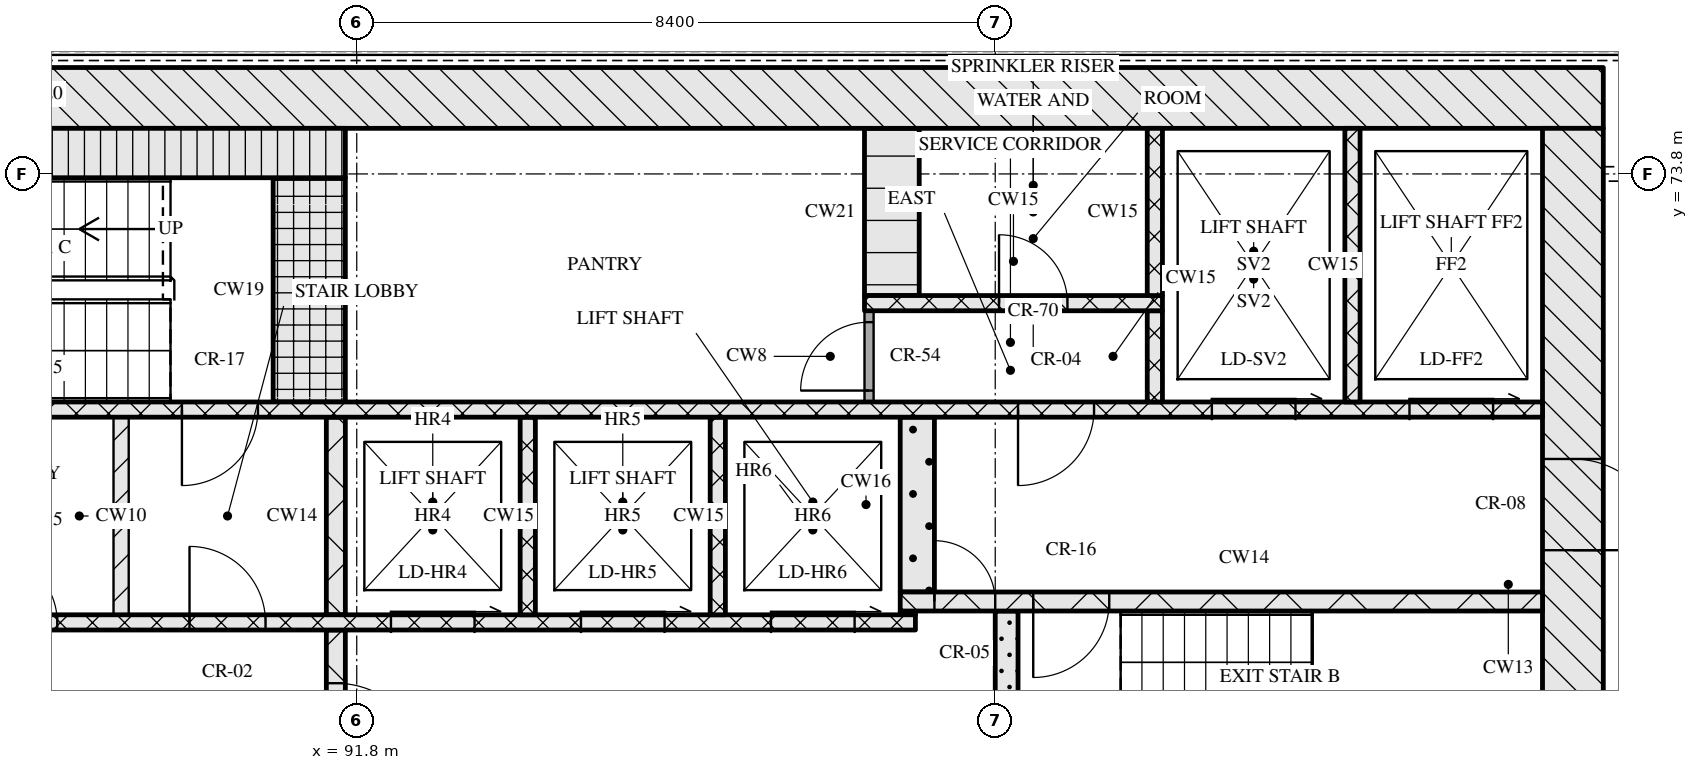
"""IFC4 building model, lengths in metres.
Left out: names, types, materials, properties, quantities, classifications, styles, units other than length and angle.
Written with IfcOpenShell. Run it as: python <this file> out.ifc"""

import sys

from ifc_helpers import new_model, si_unit, direction, frame, frame_2d, origin, place, context, subcontext, project, spatial, rectangle, extrude, element, fill, save


model = new_model("IFC4")
c1 = context("Model", 3, precision=1e-05, world=origin(), true_north=direction((0.0, 1.0)))
c2 = subcontext(c1, "Body", "Model", "MODEL_VIEW")
j1 = project(units=[si_unit("LENGTHUNIT", "METRE"), si_unit("PLANEANGLEUNIT", "RADIAN")], contexts=[c1])
p1 = place(None, origin())
s1 = spatial("IfcSite", under=j1, at=p1, CompositionType="ELEMENT")
p2 = place(p1, origin())
s2 = spatial("IfcBuilding", under=s1, at=p2, CompositionType="ELEMENT")
p3 = place(p2, frame((0.0, 0.0, 179.85)))
s3 = spatial("IfcBuildingStorey", under=s2, at=p3, CompositionType="ELEMENT", Elevation=179.85)
p4 = place(p3, frame((67.0, 74.8, 0.0), z_axis=(0.0, 0.0, 1.0), x_axis=(1.0, 0.0, 0.0)))
e1 = element("IfcWall", 1, at=p4, inside=s3, PredefinedType="SOLIDWALL", context=c2, shape_type="SweptSolid", body=[
    extrude(rectangle(XDim=41.2, YDim=0.8, at=frame_2d((20.6, 0.0))), origin(), (0.0, 0.0, 1.0), 3.32),
])
p5 = place(p3, frame((107.8, 62.4, 0.0), z_axis=(0.0, 0.0, 1.0), x_axis=(0.0, 1.0, 0.0)))
e2 = element("IfcWall", 2, at=p5, inside=s3, PredefinedType="SOLIDWALL", context=c2, shape_type="SweptSolid", body=[
    extrude(rectangle(XDim=12.0, YDim=0.8, at=frame_2d((6.0, 0.0))), origin(), (0.0, 0.0, 1.0), 3.32),
])
p6 = place(p5, frame((6.45, 0.0, 0.0)))
e3 = element("IfcOpeningElement", 3, at=p6, cuts=e2, PredefinedType="OPENING", context=c2, shape_type="SweptSolid", body=[
    extrude(rectangle(XDim=1.2, YDim=2.1, at=frame_2d((0.6, 1.05))), frame((0.0, 0.41, 0.0), z_axis=(0.0, -1.0, 0.0), x_axis=(1.0, 0.0, 0.0)), (0.0, 0.0, 1.0), 0.82),
])
p7 = place(p3, frame((91.525, 65.2, 0.0), z_axis=(0.0, 0.0, 1.0), x_axis=(0.0, 1.0, 0.0)))
e4 = element("IfcWall", 4, at=p7, inside=s3, PredefinedType="SOLIDWALL", context=c2, shape_type="SweptSolid", body=[
    extrude(rectangle(XDim=2.6, YDim=0.25, at=frame_2d((1.3, 0.0))), origin(), (0.0, 0.0, 1.0), 3.32),
])
p8 = place(p7, frame((0.7, 0.0, 0.0)))
e5 = element("IfcOpeningElement", 5, at=p8, cuts=e4, PredefinedType="OPENING", context=c2, shape_type="SweptSolid", body=[
    extrude(rectangle(XDim=1.2, YDim=2.1, at=frame_2d((0.6, 1.05))), frame((0.0, 0.135, 0.0), z_axis=(0.0, -1.0, 0.0), x_axis=(1.0, 0.0, 0.0)), (0.0, 0.0, 1.0), 0.27),
])
p9 = place(p3, frame((100.35, 65.2, 0.0), z_axis=(0.0, 0.0, 1.0), x_axis=(0.0, 1.0, 0.0)))
e6 = element("IfcWall", 6, at=p9, inside=s3, PredefinedType="SOLIDWALL", context=c2, shape_type="SweptSolid", body=[
    extrude(rectangle(XDim=2.85, YDim=0.3, at=frame_2d((1.425, 0.0))), origin(), (0.0, 0.0, 1.0), 3.32),
])
p10 = place(p3, frame((76.05, 67.9, 0.0), z_axis=(0.0, 0.0, 1.0), x_axis=(1.0, 0.0, 0.0)))
e7 = element("IfcWall", 7, at=p10, inside=s3, PredefinedType="SOLIDWALL", context=c2, shape_type="SweptSolid", body=[
    extrude(rectangle(XDim=23.1, YDim=0.2, at=frame_2d((11.55, 0.0))), origin(), (0.0, 0.0, 1.0), 3.32),
])
p11 = place(p10, frame((0.75, 0.0, 0.0)))
e8 = element("IfcOpeningElement", 8, at=p11, cuts=e7, PredefinedType="OPENING", context=c2, shape_type="SweptSolid", body=[
    extrude(rectangle(XDim=0.9, YDim=2.1, at=frame_2d((0.45, 1.05))), frame((0.0, 0.11, 0.0), z_axis=(0.0, -1.0, 0.0), x_axis=(1.0, 0.0, 0.0)), (0.0, 0.0, 1.0), 0.22),
])
p12 = place(p10, frame((3.32, 0.0, 0.0)))
e9 = element("IfcOpeningElement", 9, at=p12, cuts=e7, PredefinedType="OPENING", context=c2, shape_type="SweptSolid", body=[
    extrude(rectangle(XDim=0.9, YDim=2.1, at=frame_2d((0.45, 1.05))), frame((0.0, 0.11, 0.0), z_axis=(0.0, -1.0, 0.0), x_axis=(1.0, 0.0, 0.0)), (0.0, 0.0, 1.0), 0.22),
])
p13 = place(p10, frame((5.77, 0.0, 0.0)))
e10 = element("IfcOpeningElement", 10, at=p13, cuts=e7, PredefinedType="OPENING", context=c2, shape_type="SweptSolid", body=[
    extrude(rectangle(XDim=0.9, YDim=2.1, at=frame_2d((0.45, 1.05))), frame((0.0, 0.11, 0.0), z_axis=(0.0, -1.0, 0.0), x_axis=(1.0, 0.0, 0.0)), (0.0, 0.0, 1.0), 0.22),
])
p14 = place(p10, frame((8.45, 0.0, 0.0)))
e11 = element("IfcOpeningElement", 11, at=p14, cuts=e7, PredefinedType="OPENING", context=c2, shape_type="SweptSolid", body=[
    extrude(rectangle(XDim=0.9, YDim=2.1, at=frame_2d((0.45, 1.05))), frame((0.0, 0.11, 0.0), z_axis=(0.0, -1.0, 0.0), x_axis=(1.0, 0.0, 0.0)), (0.0, 0.0, 1.0), 0.22),
])
p15 = place(p10, frame((10.91, 0.0, 0.0)))
e12 = element("IfcOpeningElement", 12, at=p15, cuts=e7, PredefinedType="OPENING", context=c2, shape_type="SweptSolid", body=[
    extrude(rectangle(XDim=0.9, YDim=2.1, at=frame_2d((0.45, 1.05))), frame((0.0, 0.11, 0.0), z_axis=(0.0, -1.0, 0.0), x_axis=(1.0, 0.0, 0.0)), (0.0, 0.0, 1.0), 0.22),
])
p16 = place(p10, frame((13.55, 0.0, 0.0)))
e13 = element("IfcOpeningElement", 13, at=p16, cuts=e7, PredefinedType="OPENING", context=c2, shape_type="SweptSolid", body=[
    extrude(rectangle(XDim=1.0, YDim=2.1, at=frame_2d((0.5, 1.05))), frame((0.0, 0.11, 0.0), z_axis=(0.0, -1.0, 0.0), x_axis=(1.0, 0.0, 0.0)), (0.0, 0.0, 1.0), 0.22),
])
p17 = place(p10, frame((16.2, 0.0, 0.0)))
e14 = element("IfcOpeningElement", 14, at=p17, cuts=e7, PredefinedType="OPENING", context=c2, shape_type="SweptSolid", body=[
    extrude(rectangle(XDim=1.1, YDim=2.1, at=frame_2d((0.55, 1.05))), frame((0.0, 0.11, 0.0), z_axis=(0.0, -1.0, 0.0), x_axis=(1.0, 0.0, 0.0)), (0.0, 0.0, 1.0), 0.22),
])
p18 = place(p10, frame((18.7, 0.0, 0.0)))
e15 = element("IfcOpeningElement", 15, at=p18, cuts=e7, PredefinedType="OPENING", context=c2, shape_type="SweptSolid", body=[
    extrude(rectangle(XDim=1.1, YDim=2.1, at=frame_2d((0.55, 1.05))), frame((0.0, 0.11, 0.0), z_axis=(0.0, -1.0, 0.0), x_axis=(1.0, 0.0, 0.0)), (0.0, 0.0, 1.0), 0.22),
])
p19 = place(p10, frame((21.2, 0.0, 0.0)))
e16 = element("IfcOpeningElement", 16, at=p19, cuts=e7, PredefinedType="OPENING", context=c2, shape_type="SweptSolid", body=[
    extrude(rectangle(XDim=1.1, YDim=2.1, at=frame_2d((0.55, 1.05))), frame((0.0, 0.11, 0.0), z_axis=(0.0, -1.0, 0.0), x_axis=(1.0, 0.0, 0.0)), (0.0, 0.0, 1.0), 0.22),
])
p20 = place(p3, frame((88.7, 68.0, 0.0), z_axis=(0.0, 0.0, 1.0), x_axis=(0.0, 1.0, 0.0)))
e17 = element("IfcWall", 17, at=p20, inside=s3, PredefinedType="PARTITIONING", context=c2, shape_type="SweptSolid", body=[
    extrude(rectangle(XDim=2.6, YDim=0.2, at=frame_2d((1.3, 0.0))), origin(), (0.0, 0.0, 1.0), 3.32),
])
p21 = place(p3, frame((91.525, 68.0, 0.0), z_axis=(0.0, 0.0, 1.0), x_axis=(0.0, 1.0, 0.0)))
e18 = element("IfcWall", 18, at=p21, inside=s3, PredefinedType="SOLIDWALL", context=c2, shape_type="SweptSolid", body=[
    extrude(rectangle(XDim=2.6, YDim=0.25, at=frame_2d((1.3, 0.0))), origin(), (0.0, 0.0, 1.0), 3.32),
])
for number, where, z_axis, x_axis in (
    (19, (94.05, 68.0, 0.0), (0.0, 0.0, 1.0), (0.0, 1.0, 0.0)),
    (20, (96.55, 68.0, 0.0), (0.0, 0.0, 1.0), (0.0, 1.0, 0.0)),
):
    element("IfcWall", number, at=place(p3, frame(where, z_axis=z_axis, x_axis=x_axis)), inside=s3, PredefinedType="SOLIDWALL", context=c2, shape_type="SweptSolid", body=[
        extrude(rectangle(XDim=2.6, YDim=0.2, at=frame_2d((1.3, 0.0))), origin(), (0.0, 0.0, 1.0), 3.32),
    ])
p22 = place(p3, frame((98.95, 68.025, 0.0), z_axis=(0.0, 0.0, 1.0), x_axis=(1.0, 0.0, 0.0)))
e21 = element("IfcWall", 21, at=p22, inside=s3, PredefinedType="SOLIDWALL", context=c2, shape_type="SweptSolid", body=[
    extrude(rectangle(XDim=0.2, YDim=0.05, at=frame_2d((0.1, 0.0))), origin(), (0.0, 0.0, 1.0), 3.32),
])
p23 = place(p3, frame((98.95, 68.175, 0.0), z_axis=(0.0, 0.0, 1.0), x_axis=(1.0, 0.0, 0.0)))
e22 = element("IfcWall", 22, at=p23, inside=s3, PredefinedType="SOLIDWALL", context=c2, shape_type="SweptSolid", body=[
    extrude(rectangle(XDim=8.45, YDim=0.25, at=frame_2d((4.225, 0.0))), origin(), (0.0, 0.0, 1.0), 3.32),
])
p24 = place(p23, frame((0.45, 0.0, 0.0)))
e23 = element("IfcOpeningElement", 23, at=p24, cuts=e22, PredefinedType="OPENING", context=c2, shape_type="SweptSolid", body=[
    extrude(rectangle(XDim=0.8, YDim=2.1, at=frame_2d((0.4, 1.05))), frame((0.0, 0.135, 0.0), z_axis=(0.0, -1.0, 0.0), x_axis=(1.0, 0.0, 0.0)), (0.0, 0.0, 1.0), 0.27),
])
p25 = place(p23, frame((1.75, 0.0, 0.0)))
e24 = element("IfcOpeningElement", 24, at=p25, cuts=e22, PredefinedType="OPENING", context=c2, shape_type="SweptSolid", body=[
    extrude(rectangle(XDim=1.0, YDim=2.1, at=frame_2d((0.5, 1.05))), frame((0.0, 0.135, 0.0), z_axis=(0.0, -1.0, 0.0), x_axis=(1.0, 0.0, 0.0)), (0.0, 0.0, 1.0), 0.27),
])
p26 = place(p3, frame((99.175, 68.3, 0.0), z_axis=(0.0, 0.0, 1.0), x_axis=(0.0, 1.0, 0.0)))
e25 = element("IfcWall", 25, at=p26, inside=s3, PredefinedType="SOLIDWALL", context=c2, shape_type="SweptSolid", body=[
    extrude(rectangle(XDim=2.3, YDim=0.45, at=frame_2d((1.15, 0.0))), origin(), (0.0, 0.0, 1.0), 3.32),
])
p27 = place(p3, frame((67.8, 70.7, 0.0), z_axis=(0.0, 0.0, 1.0), x_axis=(1.0, 0.0, 0.0)))
e26 = element("IfcWall", 26, at=p27, inside=s3, PredefinedType="SOLIDWALL", context=c2, shape_type="SweptSolid", body=[
    extrude(rectangle(XDim=39.6, YDim=0.2, at=frame_2d((19.8, 0.0))), origin(), (0.0, 0.0, 1.0), 3.32),
])
p28 = place(p27, frame((0.65, 0.0, 0.0)))
e27 = element("IfcOpeningElement", 27, at=p28, cuts=e26, PredefinedType="OPENING", context=c2, shape_type="SweptSolid", body=[
    extrude(rectangle(XDim=1.1, YDim=2.1, at=frame_2d((0.55, 1.05))), frame((0.0, 0.11, 0.0), z_axis=(0.0, -1.0, 0.0), x_axis=(1.0, 0.0, 0.0)), (0.0, 0.0, 1.0), 0.22),
])
p29 = place(p27, frame((3.25, 0.0, 0.0)))
e28 = element("IfcOpeningElement", 28, at=p29, cuts=e26, PredefinedType="OPENING", context=c2, shape_type="SweptSolid", body=[
    extrude(rectangle(XDim=1.1, YDim=2.1, at=frame_2d((0.55, 1.05))), frame((0.0, 0.11, 0.0), z_axis=(0.0, -1.0, 0.0), x_axis=(1.0, 0.0, 0.0)), (0.0, 0.0, 1.0), 0.22),
])
p30 = place(p27, frame((5.9, 0.0, 0.0)))
e29 = element("IfcOpeningElement", 29, at=p30, cuts=e26, PredefinedType="OPENING", context=c2, shape_type="SweptSolid", body=[
    extrude(rectangle(XDim=1.0, YDim=2.1, at=frame_2d((0.5, 1.05))), frame((0.0, 0.11, 0.0), z_axis=(0.0, -1.0, 0.0), x_axis=(1.0, 0.0, 0.0)), (0.0, 0.0, 1.0), 0.22),
])
p31 = place(p27, frame((21.7, 0.0, 0.0)))
e30 = element("IfcOpeningElement", 30, at=p31, cuts=e26, PredefinedType="OPENING", context=c2, shape_type="SweptSolid", body=[
    extrude(rectangle(XDim=1.0, YDim=2.1, at=frame_2d((0.5, 1.05))), frame((0.0, 0.11, 0.0), z_axis=(0.0, -1.0, 0.0), x_axis=(1.0, 0.0, 0.0)), (0.0, 0.0, 1.0), 0.22),
])
p32 = place(p27, frame((32.7, 0.0, 0.0)))
e31 = element("IfcOpeningElement", 31, at=p32, cuts=e26, PredefinedType="OPENING", context=c2, shape_type="SweptSolid", body=[
    extrude(rectangle(XDim=1.0, YDim=2.1, at=frame_2d((0.5, 1.05))), frame((0.0, 0.11, 0.0), z_axis=(0.0, -1.0, 0.0), x_axis=(1.0, 0.0, 0.0)), (0.0, 0.0, 1.0), 0.22),
])
p33 = place(p27, frame((35.25, 0.0, 0.0)))
e32 = element("IfcOpeningElement", 32, at=p33, cuts=e26, PredefinedType="OPENING", context=c2, shape_type="SweptSolid", body=[
    extrude(rectangle(XDim=1.1, YDim=2.1, at=frame_2d((0.55, 1.05))), frame((0.0, 0.11, 0.0), z_axis=(0.0, -1.0, 0.0), x_axis=(1.0, 0.0, 0.0)), (0.0, 0.0, 1.0), 0.22),
])
p34 = place(p27, frame((37.85, 0.0, 0.0)))
e33 = element("IfcOpeningElement", 33, at=p34, cuts=e26, PredefinedType="OPENING", context=c2, shape_type="SweptSolid", body=[
    extrude(rectangle(XDim=1.1, YDim=2.1, at=frame_2d((0.55, 1.05))), frame((0.0, 0.11, 0.0), z_axis=(0.0, -1.0, 0.0), x_axis=(1.0, 0.0, 0.0)), (0.0, 0.0, 1.0), 0.22),
])
p35 = place(p3, frame((91.175, 70.8, 0.0), z_axis=(0.0, 0.0, 1.0), x_axis=(0.0, 1.0, 0.0)))
e34 = element("IfcWall", 34, at=p35, inside=s3, PredefinedType="SOLIDWALL", context=c2, shape_type="SweptSolid", body=[
    extrude(rectangle(XDim=2.95, YDim=0.95, at=frame_2d((1.475, 0.0))), origin(), (0.0, 0.0, 1.0), 3.32),
])
p36 = place(p3, frame((98.54, 70.8, 0.0), z_axis=(0.0, 0.0, 1.0), x_axis=(0.0, 1.0, 0.0)))
e35 = element("IfcWall", 35, at=p36, inside=s3, PredefinedType="PARTITIONING", context=c2, shape_type="SweptSolid", body=[
    extrude(rectangle(XDim=1.2, YDim=0.12, at=frame_2d((0.6, 0.0))), origin(), (0.0, 0.0, 1.0), 3.32),
])
p37 = place(p36, frame((0.15, 0.0, 0.0)))
e36 = element("IfcOpeningElement", 36, at=p37, cuts=e35, PredefinedType="OPENING", context=c2, shape_type="SweptSolid", body=[
    extrude(rectangle(XDim=0.9, YDim=2.1, at=frame_2d((0.45, 1.05))), frame((0.0, 0.07, 0.0), z_axis=(0.0, -1.0, 0.0), x_axis=(1.0, 0.0, 0.0)), (0.0, 0.0, 1.0), 0.14),
])
p38 = place(p3, frame((102.3, 70.8, 0.0), z_axis=(0.0, 0.0, 1.0), x_axis=(0.0, 1.0, 0.0)))
e37 = element("IfcWall", 37, at=p38, inside=s3, PredefinedType="SOLIDWALL", context=c2, shape_type="SweptSolid", body=[
    extrude(rectangle(XDim=1.2, YDim=0.2, at=frame_2d((0.6, 0.0))), origin(), (0.0, 0.0, 1.0), 3.32),
])
p39 = place(p3, frame((104.9, 70.8, 0.0), z_axis=(0.0, 0.0, 1.0), x_axis=(0.0, 1.0, 0.0)))
e38 = element("IfcWall", 38, at=p39, inside=s3, PredefinedType="SOLIDWALL", context=c2, shape_type="SweptSolid", body=[
    extrude(rectangle(XDim=3.6, YDim=0.2, at=frame_2d((1.8, 0.0))), origin(), (0.0, 0.0, 1.0), 3.32),
])
p40 = place(p3, frame((98.48, 72.1, 0.0), z_axis=(0.0, 0.0, 1.0), x_axis=(1.0, 0.0, 0.0)))
e39 = element("IfcWall", 39, at=p40, inside=s3, PredefinedType="SOLIDWALL", context=c2, shape_type="SweptSolid", body=[
    extrude(rectangle(XDim=3.92, YDim=0.2, at=frame_2d((1.96, 0.0))), origin(), (0.0, 0.0, 1.0), 3.32),
])
p41 = place(p40, frame((1.77, 0.0, 0.0)))
e40 = element("IfcOpeningElement", 40, at=p41, cuts=e39, PredefinedType="OPENING", context=c2, shape_type="SweptSolid", body=[
    extrude(rectangle(XDim=0.9, YDim=2.1, at=frame_2d((0.45, 1.05))), frame((0.0, 0.11, 0.0), z_axis=(0.0, -1.0, 0.0), x_axis=(1.0, 0.0, 0.0)), (0.0, 0.0, 1.0), 0.22),
])
p42 = place(p3, frame((98.84, 72.2, 0.0), z_axis=(0.0, 0.0, 1.0), x_axis=(0.0, 1.0, 0.0)))
e41 = element("IfcWall", 41, at=p42, inside=s3, PredefinedType="SOLIDWALL", context=c2, shape_type="SweptSolid", body=[
    extrude(rectangle(XDim=2.2, YDim=0.72, at=frame_2d((1.1, 0.0))), origin(), (0.0, 0.0, 1.0), 3.32),
])
p43 = place(p3, frame((102.3, 72.2, 0.0), z_axis=(0.0, 0.0, 1.0), x_axis=(0.0, 1.0, 0.0)))
e42 = element("IfcWall", 42, at=p43, inside=s3, PredefinedType="SOLIDWALL", context=c2, shape_type="SweptSolid", body=[
    extrude(rectangle(XDim=2.2, YDim=0.2, at=frame_2d((1.1, 0.0))), origin(), (0.0, 0.0, 1.0), 3.32),
])
p44 = place(p3, frame((83.55, 74.075, 0.0), z_axis=(0.0, 0.0, 1.0), x_axis=(1.0, 0.0, 0.0)))
e43 = element("IfcWall", 43, at=p44, inside=s3, PredefinedType="SOLIDWALL", context=c2, shape_type="SweptSolid", body=[
    extrude(rectangle(XDim=8.1, YDim=0.65, at=frame_2d((4.05, 0.0))), origin(), (0.0, 0.0, 1.0), 3.32),
])
p45 = place(p8, origin())
e44 = element("IfcDoor", 44, at=p45, inside=s3, OperationType="SINGLE_SWING_RIGHT", PredefinedType="DOOR", context=c2, shape_type="SweptSolid", body=[
    extrude(rectangle(XDim=1.2, YDim=2.1, at=frame_2d((0.6, 1.05))), frame((0.0, 0.025, 0.0), z_axis=(0.0, -1.0, 0.0), x_axis=(1.0, 0.0, 0.0)), (0.0, 0.0, 1.0), 0.05),
])
fill(e5, e44)
p46 = place(p15, origin())
e45 = element("IfcDoor", 45, at=p46, inside=s3, OperationType="SINGLE_SWING_LEFT", PredefinedType="DOOR", context=c2, shape_type="SweptSolid", body=[
    extrude(rectangle(XDim=0.9, YDim=2.1, at=frame_2d((0.45, 1.05))), frame((0.0, 0.025, 0.0), z_axis=(0.0, -1.0, 0.0), x_axis=(1.0, 0.0, 0.0)), (0.0, 0.0, 1.0), 0.05),
])
fill(e12, e45)
p47 = place(p16, origin())
e46 = element("IfcDoor", 46, at=p47, inside=s3, OperationType="SINGLE_SWING_LEFT", PredefinedType="DOOR", context=c2, shape_type="SweptSolid", body=[
    extrude(rectangle(XDim=1.0, YDim=2.1, at=frame_2d((0.5, 1.05))), frame((0.0, 0.025, 0.0), z_axis=(0.0, -1.0, 0.0), x_axis=(1.0, 0.0, 0.0)), (0.0, 0.0, 1.0), 0.05),
])
fill(e13, e46)
p48 = place(p17, origin())
e47 = element("IfcDoor", 47, at=p48, inside=s3, OperationType="SLIDING_TO_RIGHT", PredefinedType="DOOR", context=c2, shape_type="SweptSolid", body=[
    extrude(rectangle(XDim=1.1, YDim=2.1, at=frame_2d((0.55, 1.05))), frame((0.0, 0.025, 0.0), z_axis=(0.0, -1.0, 0.0), x_axis=(1.0, 0.0, 0.0)), (0.0, 0.0, 1.0), 0.05),
])
fill(e14, e47)
p49 = place(p18, origin())
e48 = element("IfcDoor", 48, at=p49, inside=s3, OperationType="SLIDING_TO_RIGHT", PredefinedType="DOOR", context=c2, shape_type="SweptSolid", body=[
    extrude(rectangle(XDim=1.1, YDim=2.1, at=frame_2d((0.55, 1.05))), frame((0.0, 0.025, 0.0), z_axis=(0.0, -1.0, 0.0), x_axis=(1.0, 0.0, 0.0)), (0.0, 0.0, 1.0), 0.05),
])
fill(e15, e48)
p50 = place(p19, origin())
e49 = element("IfcDoor", 49, at=p50, inside=s3, OperationType="SLIDING_TO_RIGHT", PredefinedType="DOOR", context=c2, shape_type="SweptSolid", body=[
    extrude(rectangle(XDim=1.1, YDim=2.1, at=frame_2d((0.55, 1.05))), frame((0.0, 0.025, 0.0), z_axis=(0.0, -1.0, 0.0), x_axis=(1.0, 0.0, 0.0)), (0.0, 0.0, 1.0), 0.05),
])
fill(e16, e49)
p51 = place(p24, origin())
e50 = element("IfcDoor", 50, at=p51, inside=s3, OperationType="SINGLE_SWING_LEFT", PredefinedType="DOOR", context=c2, shape_type="SweptSolid", body=[
    extrude(rectangle(XDim=0.8, YDim=2.1, at=frame_2d((0.4, 1.05))), frame((0.0, 0.025, 0.0), z_axis=(0.0, -1.0, 0.0), x_axis=(1.0, 0.0, 0.0)), (0.0, 0.0, 1.0), 0.05),
])
fill(e23, e50)
p52 = place(p25, origin())
e51 = element("IfcDoor", 51, at=p52, inside=s3, OperationType="SINGLE_SWING_RIGHT", PredefinedType="DOOR", context=c2, shape_type="SweptSolid", body=[
    extrude(rectangle(XDim=1.0, YDim=2.1, at=frame_2d((0.5, 1.05))), frame((0.0, 0.025, 0.0), z_axis=(0.0, -1.0, 0.0), x_axis=(1.0, 0.0, 0.0)), (0.0, 0.0, 1.0), 0.05),
])
fill(e24, e51)
p53 = place(p6, origin())
e52 = element("IfcDoor", 52, at=p53, inside=s3, OperationType="SINGLE_SWING_RIGHT", PredefinedType="DOOR", context=c2, shape_type="SweptSolid", body=[
    extrude(rectangle(XDim=1.2, YDim=2.1, at=frame_2d((0.6, 1.05))), frame((0.0, 0.025, 0.0), z_axis=(0.0, -1.0, 0.0), x_axis=(1.0, 0.0, 0.0)), (0.0, 0.0, 1.0), 0.05),
])
fill(e3, e52)
p54 = place(p31, origin())
e53 = element("IfcDoor", 53, at=p54, inside=s3, OperationType="SINGLE_SWING_RIGHT", PredefinedType="DOOR", context=c2, shape_type="SweptSolid", body=[
    extrude(rectangle(XDim=1.0, YDim=2.1, at=frame_2d((0.5, 1.05))), frame((0.0, 0.025, 0.0), z_axis=(0.0, -1.0, 0.0), x_axis=(1.0, 0.0, 0.0)), (0.0, 0.0, 1.0), 0.05),
])
fill(e30, e53)
p55 = place(p32, origin())
e54 = element("IfcDoor", 54, at=p55, inside=s3, OperationType="SINGLE_SWING_RIGHT", PredefinedType="DOOR", context=c2, shape_type="SweptSolid", body=[
    extrude(rectangle(XDim=1.0, YDim=2.1, at=frame_2d((0.5, 1.05))), frame((0.0, 0.025, 0.0), z_axis=(0.0, -1.0, 0.0), x_axis=(1.0, 0.0, 0.0)), (0.0, 0.0, 1.0), 0.05),
])
fill(e31, e54)
p56 = place(p33, origin())
e55 = element("IfcDoor", 55, at=p56, inside=s3, OperationType="SLIDING_TO_RIGHT", PredefinedType="DOOR", context=c2, shape_type="SweptSolid", body=[
    extrude(rectangle(XDim=1.1, YDim=2.1, at=frame_2d((0.55, 1.05))), frame((0.0, 0.025, 0.0), z_axis=(0.0, -1.0, 0.0), x_axis=(1.0, 0.0, 0.0)), (0.0, 0.0, 1.0), 0.05),
])
fill(e32, e55)
p57 = place(p34, origin())
e56 = element("IfcDoor", 56, at=p57, inside=s3, OperationType="SLIDING_TO_RIGHT", PredefinedType="DOOR", context=c2, shape_type="SweptSolid", body=[
    extrude(rectangle(XDim=1.1, YDim=2.1, at=frame_2d((0.55, 1.05))), frame((0.0, 0.025, 0.0), z_axis=(0.0, -1.0, 0.0), x_axis=(1.0, 0.0, 0.0)), (0.0, 0.0, 1.0), 0.05),
])
fill(e33, e56)
p58 = place(p37, origin())
e57 = element("IfcDoor", 57, at=p58, inside=s3, OperationType="SINGLE_SWING_LEFT", PredefinedType="DOOR", context=c2, shape_type="SweptSolid", body=[
    extrude(rectangle(XDim=0.9, YDim=2.1, at=frame_2d((0.45, 1.05))), frame((0.0, 0.025, 0.0), z_axis=(0.0, -1.0, 0.0), x_axis=(1.0, 0.0, 0.0)), (0.0, 0.0, 1.0), 0.05),
])
fill(e36, e57)
p59 = place(p41, origin())
e58 = element("IfcDoor", 58, at=p59, inside=s3, OperationType="SINGLE_SWING_LEFT", PredefinedType="DOOR", context=c2, shape_type="SweptSolid", body=[
    extrude(rectangle(XDim=0.9, YDim=2.1, at=frame_2d((0.45, 1.05))), frame((0.0, 0.025, 0.0), z_axis=(0.0, -1.0, 0.0), x_axis=(1.0, 0.0, 0.0)), (0.0, 0.0, 1.0), 0.05),
])
fill(e40, e58)
save(model, sys.argv[1])
